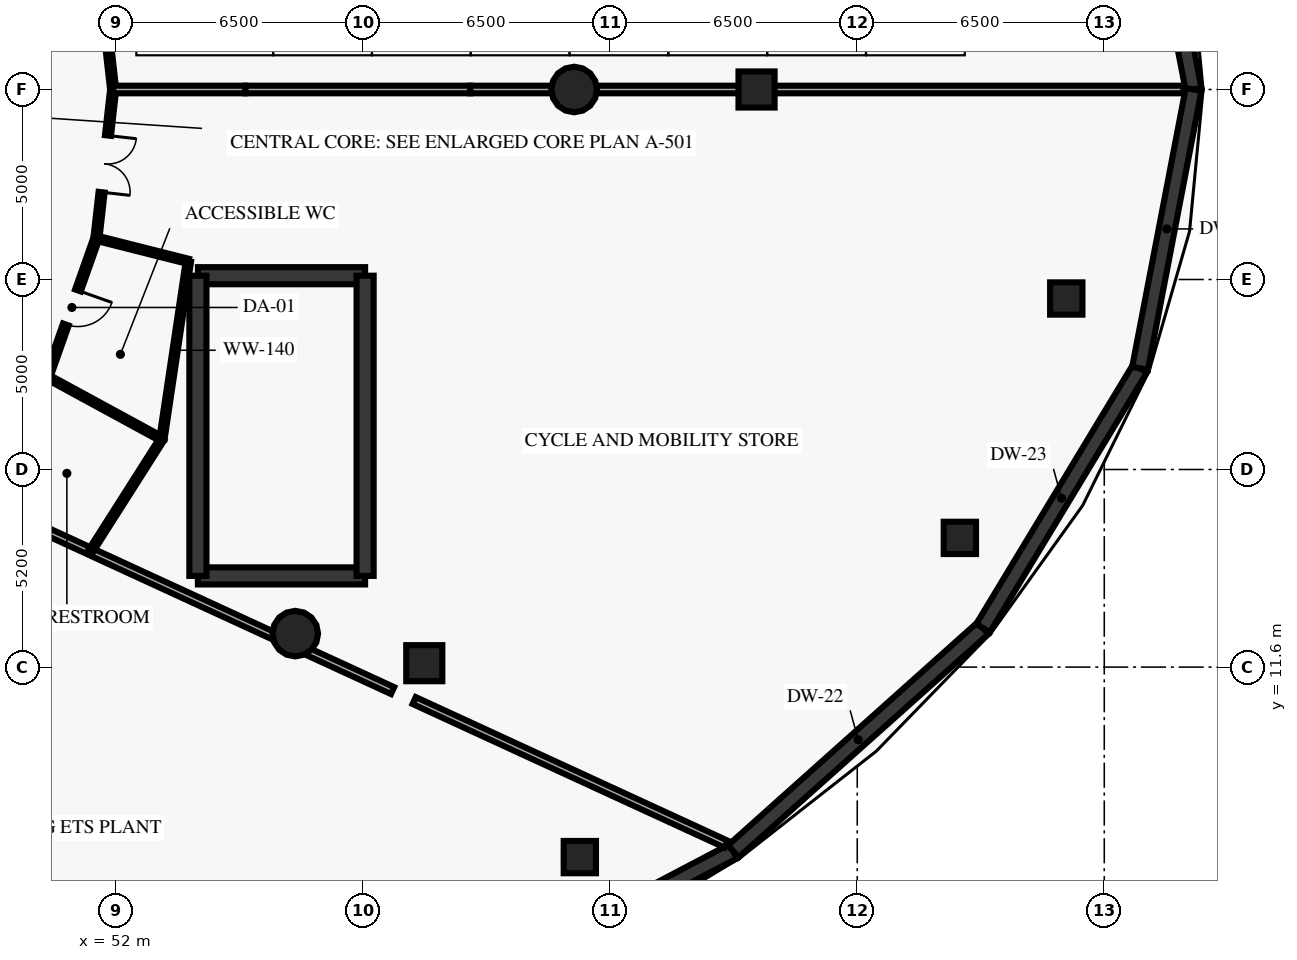
"""IFC4 building model, lengths in metres.
Left out: names, types, materials, properties, quantities, classifications, styles, units other than length and angle.
Written with IfcOpenShell. Run it as: python <this file> out.ifc"""

import sys

from ifc_helpers import new_model, si_unit, direction, frame, frame_2d, origin, origin_2d, place, context, subcontext, project, spatial, rectangle, circle, extrude, element, fill, save


model = new_model("IFC4")
c1 = context("Model", 3, precision=1e-05, world=origin(), true_north=direction((0.0, 1.0)))
c2 = subcontext(c1, "Body", "Model", "MODEL_VIEW")
j1 = project(units=[si_unit("LENGTHUNIT", "METRE"), si_unit("PLANEANGLEUNIT", "RADIAN")], contexts=[c1])
p1 = place(None, origin())
s1 = spatial("IfcSite", under=j1, at=p1, CompositionType="ELEMENT")
p2 = place(p1, origin())
s2 = spatial("IfcBuilding", under=s1, at=p2, CompositionType="ELEMENT")
p3 = place(p2, frame((0.0, 0.0, -9.0)))
s3 = spatial("IfcBuildingStorey", under=s2, at=p3, CompositionType="ELEMENT", Elevation=-9.0)
for number, where, z_axis, x_axis in (
    (1, (64.05, 26.8, 0.0), (0.0, 0.0, 1.0), (1.0, 0.0, 0.0)),
    (2, (56.713, 12.481, 0.0), (0.0, 0.0, 1.0), (1.0, 0.0, 0.0)),
):
    element("IfcColumn", number, at=place(p3, frame(where, z_axis=z_axis, x_axis=x_axis)), inside=s3, PredefinedType="COLUMN", context=c2, shape_type="SweptSolid", body=[
        extrude(circle(Radius=0.6, at=origin_2d()), origin(), (0.0, 0.0, 1.0), 4.2),
    ])
for number, where, z_axis, x_axis in (
    (3, (68.85, 26.8, 0.0), (0.0, 0.0, 1.0), (1.0, 0.0, 0.0)),
    (4, (60.107, 11.703, 0.0), (0.0, 0.0, 1.0), (1.0, 0.0, 0.0)),
):
    element("IfcColumn", number, at=place(p3, frame(where, z_axis=z_axis, x_axis=x_axis)), inside=s3, PredefinedType="COLUMN", context=c2, shape_type="SweptSolid", body=[
        extrude(rectangle(XDim=0.95, YDim=0.95, at=origin_2d()), origin(), (0.0, 0.0, 1.0), 4.2),
    ])
for number, where, z_axis, x_axis in (
    (5, (77.0, 21.3, 0.0), (0.0, 0.0, 1.0), (1.0, 0.0, 0.0)),
    (6, (74.2, 15.0, 0.0), (0.0, 0.0, 1.0), (1.0, 0.0, 0.0)),
    (7, (64.2, 6.6, 0.0), (0.0, 0.0, 1.0), (1.0, 0.0, 0.0)),
):
    element("IfcColumn", number, at=place(p3, frame(where, z_axis=z_axis, x_axis=x_axis)), inside=s3, PredefinedType="COLUMN", context=c2, shape_type="SweptSolid", body=[
        extrude(rectangle(XDim=0.85, YDim=0.85, at=origin_2d()), origin(), (0.0, 0.0, 1.0), 4.2),
    ])
p4 = place(p3, frame((80.35, 26.8, 0.0), z_axis=(0.0, 0.0, 1.0), x_axis=(-0.188595316219, 0.982054889861, 0.0)))
e8 = element("IfcWall", 8, at=p4, inside=s3, PredefinedType="SHEAR", context=c2, shape_type="SweptSolid", body=[
    extrude(rectangle(XDim=7.472, YDim=0.42, at=frame_2d((3.736, 0.0))), origin(), (0.0, 0.0, 1.0), 4.2),
])
p5 = place(p3, frame((59.675, 2.248, 0.0), z_axis=(0.0, 0.0, 1.0), x_axis=(0.884981697028, 0.46562581106, 0.0)))
e9 = element("IfcWall", 9, at=p5, inside=s3, PredefinedType="SHEAR", context=c2, shape_type="SweptSolid", body=[
    extrude(rectangle(XDim=9.677, YDim=0.42, at=frame_2d((4.838, 0.0))), origin(), (0.0, 0.0, 1.0), 4.2),
])
p6 = place(p3, frame((68.239, 6.754, 0.0), z_axis=(0.0, 0.0, 1.0), x_axis=(0.745707061302, 0.666273951707, 0.0)))
e10 = element("IfcWall", 10, at=p6, inside=s3, PredefinedType="SHEAR", context=c2, shape_type="SweptSolid", body=[
    extrude(rectangle(XDim=8.812, YDim=0.42, at=frame_2d((4.406, 0.0))), origin(), (0.0, 0.0, 1.0), 4.2),
])
p7 = place(p3, frame((74.81, 12.625, 0.0), z_axis=(0.0, 0.0, 1.0), x_axis=(0.517136164524, 0.855903141332, 0.0)))
e11 = element("IfcWall", 11, at=p7, inside=s3, PredefinedType="SHEAR", context=c2, shape_type="SweptSolid", body=[
    extrude(rectangle(XDim=7.988, YDim=0.42, at=frame_2d((3.994, 0.0))), origin(), (0.0, 0.0, 1.0), 4.2),
])
p8 = place(p3, frame((78.941, 19.462, 0.0), z_axis=(0.0, 0.0, 1.0), x_axis=(0.188589264795, 0.982056051966, 0.0)))
e12 = element("IfcWall", 12, at=p8, inside=s3, PredefinedType="SHEAR", context=c2, shape_type="SweptSolid", body=[
    extrude(rectangle(XDim=7.472, YDim=0.42, at=frame_2d((3.736, 0.0))), origin(), (0.0, 0.0, 1.0), 4.2),
])
for number, where, z_axis, x_axis in (
    (13, (54.15, 14.0, 0.0), (0.0, 0.0, 1.0), (1.0, 0.0, 0.0)),
    (14, (54.15, 21.9, 0.0), (0.0, 0.0, 1.0), (1.0, 0.0, 0.0)),
):
    element("IfcWall", number, at=place(p3, frame(where, z_axis=z_axis, x_axis=x_axis)), inside=s3, PredefinedType="SHEAR", context=c2, shape_type="SweptSolid", body=[
        extrude(rectangle(XDim=4.4, YDim=0.45, at=frame_2d((2.2, 0.0))), origin(), (0.0, 0.0, 1.0), 4.2),
    ])
for number, where, z_axis, x_axis in (
    (15, (54.15, 14.0, 0.0), (0.0, 0.0, 1.0), (0.0, 1.0, 0.0)),
    (16, (58.55, 14.0, 0.0), (0.0, 0.0, 1.0), (0.0, 1.0, 0.0)),
):
    element("IfcWall", number, at=place(p3, frame(where, z_axis=z_axis, x_axis=x_axis)), inside=s3, PredefinedType="SHEAR", context=c2, shape_type="SweptSolid", body=[
        extrude(rectangle(XDim=7.9, YDim=0.45, at=frame_2d((3.95, 0.0))), origin(), (0.0, 0.0, 1.0), 4.2),
    ])
p9 = place(p3, frame((51.92, 26.8, 0.0), z_axis=(0.0, 0.0, 1.0), x_axis=(-0.111731247657, 0.993738460711, 0.0)))
e17 = element("IfcWall", 17, at=p9, inside=s3, PredefinedType="PARTITIONING", context=c2, shape_type="SweptSolid", body=[
    extrude(rectangle(XDim=3.938, YDim=0.16, at=frame_2d((1.969, 0.0))), origin(), (0.0, 0.0, 1.0), 4.2),
])
p10 = place(p3, frame((51.48, 22.887, 0.0), z_axis=(0.0, 0.0, 1.0), x_axis=(-0.333704620558, -0.942677689467, 0.0)))
e18 = element("IfcWall", 18, at=p10, inside=s3, PredefinedType="PARTITIONING", context=c2, shape_type="SweptSolid", body=[
    extrude(rectangle(XDim=3.869, YDim=0.16, at=frame_2d((1.934, 0.0))), origin(), (0.0, 0.0, 1.0), 4.2),
])
p11 = place(p10, frame((1.459, 0.0, 0.0)))
e19 = element("IfcOpeningElement", 19, at=p11, cuts=e18, PredefinedType="OPENING", context=c2, shape_type="SweptSolid", body=[
    extrude(rectangle(XDim=0.95, YDim=2.1, at=frame_2d((0.475, 1.05))), frame((0.0, 0.09, 0.0), z_axis=(0.0, -1.0, 0.0), x_axis=(1.0, 0.0, 0.0)), (0.0, 0.0, 1.0), 0.18),
])
p12 = place(p3, frame((51.92, 26.8, 0.0), z_axis=(0.0, 0.0, 1.0), x_axis=(-0.111724363671, -0.99373923469, 0.0)))
e20 = element("IfcWall", 20, at=p12, inside=s3, PredefinedType="PARTITIONING", context=c2, shape_type="SweptSolid", body=[
    extrude(rectangle(XDim=3.938, YDim=0.16, at=frame_2d((1.969, 0.0))), origin(), (0.0, 0.0, 1.0), 4.2),
])
p13 = place(p12, frame((1.219, 0.0, 0.0)))
e21 = element("IfcOpeningElement", 21, at=p13, cuts=e20, PredefinedType="OPENING", context=c2, shape_type="SweptSolid", body=[
    extrude(rectangle(XDim=1.5, YDim=2.2, at=frame_2d((0.75, 1.1))), frame((0.0, 0.09, 0.0), z_axis=(0.0, -1.0, 0.0), x_axis=(1.0, 0.0, 0.0)), (0.0, 0.0, 1.0), 0.18),
])
p14 = place(p3, frame((51.92, 26.8, 0.0), z_axis=(0.0, 0.0, 1.0), x_axis=(1.0, 0.0, 0.0)))
e22 = element("IfcWall", 22, at=p14, inside=s3, PredefinedType="SOLIDWALL", context=c2, shape_type="SweptSolid", body=[
    extrude(rectangle(XDim=3.48, YDim=0.2, at=frame_2d((1.74, 0.0))), origin(), (0.0, 0.0, 1.0), 4.2),
])
p15 = place(p3, frame((55.4, 26.8, 0.0), z_axis=(0.0, 0.0, 1.0), x_axis=(1.0, 0.0, 0.0)))
e23 = element("IfcWall", 23, at=p15, inside=s3, PredefinedType="SOLIDWALL", context=c2, shape_type="SweptSolid", body=[
    extrude(rectangle(XDim=5.917, YDim=0.2, at=frame_2d((2.958, 0.0))), origin(), (0.0, 0.0, 1.0), 4.2),
])
p16 = place(p3, frame((61.317, 26.8, 0.0), z_axis=(0.0, 0.0, 1.0), x_axis=(1.0, 0.0, 0.0)))
e24 = element("IfcWall", 24, at=p16, inside=s3, PredefinedType="SOLIDWALL", context=c2, shape_type="SweptSolid", body=[
    extrude(rectangle(XDim=7.533, YDim=0.2, at=frame_2d((3.767, 0.0))), origin(), (0.0, 0.0, 1.0), 3.16),
])
p17 = place(p3, frame((68.85, 26.8, 0.0), z_axis=(0.0, 0.0, 1.0), x_axis=(1.0, 0.0, 0.0)))
e25 = element("IfcWall", 25, at=p17, inside=s3, PredefinedType="SOLIDWALL", context=c2, shape_type="SweptSolid", body=[
    extrude(rectangle(XDim=11.235, YDim=0.2, at=frame_2d((5.617, 0.0))), origin(), (0.0, 0.0, 1.0), 4.2),
])
p18 = place(p3, frame((48.136, 16.109, 0.0), z_axis=(0.0, 0.0, 1.0), x_axis=(0.908368089602, -0.418171512411, 0.0)))
e26 = element("IfcWall", 26, at=p18, inside=s3, PredefinedType="SOLIDWALL", context=c2, shape_type="SweptSolid", body=[
    extrude(rectangle(XDim=12.26, YDim=0.2, at=frame_2d((6.13, 0.0))), origin(), (0.0, 0.0, 1.0), 4.2),
])
p19 = place(p3, frame((59.841, 10.72, 0.0), z_axis=(0.0, 0.0, 1.0), x_axis=(0.90838663627, -0.41813122228, 0.0)))
e27 = element("IfcWall", 27, at=p19, inside=s3, PredefinedType="SOLIDWALL", context=c2, shape_type="SweptSolid", body=[
    extrude(rectangle(XDim=9.038, YDim=0.2, at=frame_2d((4.519, 0.0))), origin(), (0.0, 0.0, 1.0), 4.2),
])
p20 = place(p3, frame((50.189, 19.24, 0.0), z_axis=(0.0, 0.0, 1.0), x_axis=(0.878392721738, -0.477939563541, 0.0)))
e28 = element("IfcWall", 28, at=p20, inside=s3, PredefinedType="PARTITIONING", context=c2, shape_type="SweptSolid", body=[
    extrude(rectangle(XDim=3.431, YDim=0.14, at=frame_2d((1.716, 0.0))), origin(), (0.0, 0.0, 1.0), 4.2),
])
p21 = place(p3, frame((51.48, 22.887, 0.0), z_axis=(0.0, 0.0, 1.0), x_axis=(0.969564374521, -0.244836524357, 0.0)))
e29 = element("IfcWall", 29, at=p21, inside=s3, PredefinedType="PARTITIONING", context=c2, shape_type="SweptSolid", body=[
    extrude(rectangle(XDim=2.496, YDim=0.14, at=frame_2d((1.248, 0.0))), origin(), (0.0, 0.0, 1.0), 4.2),
])
p22 = place(p3, frame((51.322, 14.642, 0.0), z_axis=(0.0, 0.0, 1.0), x_axis=(0.53656900511, 0.84385644677, 0.0)))
e30 = element("IfcWall", 30, at=p22, inside=s3, PredefinedType="PARTITIONING", context=c2, shape_type="SweptSolid", body=[
    extrude(rectangle(XDim=3.505, YDim=0.14, at=frame_2d((1.753, 0.0))), origin(), (0.0, 0.0, 1.0), 4.2),
])
p23 = place(p3, frame((53.203, 17.6, 0.0), z_axis=(0.0, 0.0, 1.0), x_axis=(0.147441370436, 0.989070797407, 0.0)))
e31 = element("IfcWall", 31, at=p23, inside=s3, PredefinedType="PARTITIONING", context=c2, shape_type="SweptSolid", body=[
    extrude(rectangle(XDim=4.728, YDim=0.14, at=frame_2d((2.364, 0.0))), origin(), (0.0, 0.0, 1.0), 4.2),
])
p24 = place(p11, origin())
e32 = element("IfcDoor", 32, at=p24, inside=s3, OperationType="SINGLE_SWING_LEFT", PredefinedType="DOOR", context=c2, shape_type="SweptSolid", body=[
    extrude(rectangle(XDim=0.95, YDim=2.1, at=frame_2d((0.475, 1.05))), frame((0.0, 0.025, 0.0), z_axis=(0.0, -1.0, 0.0), x_axis=(1.0, 0.0, 0.0)), (0.0, 0.0, 1.0), 0.05),
])
fill(e19, e32)
p25 = place(p13, origin())
e33 = element("IfcDoor", 33, at=p25, inside=s3, OperationType="DOUBLE_DOOR_SINGLE_SWING", PredefinedType="DOOR", context=c2, shape_type="SweptSolid", body=[
    extrude(rectangle(XDim=1.5, YDim=2.2, at=frame_2d((0.75, 1.1))), frame((0.0, 0.025, 0.0), z_axis=(0.0, -1.0, 0.0), x_axis=(1.0, 0.0, 0.0)), (0.0, 0.0, 1.0), 0.05),
])
fill(e21, e33)
save(model, sys.argv[1])
